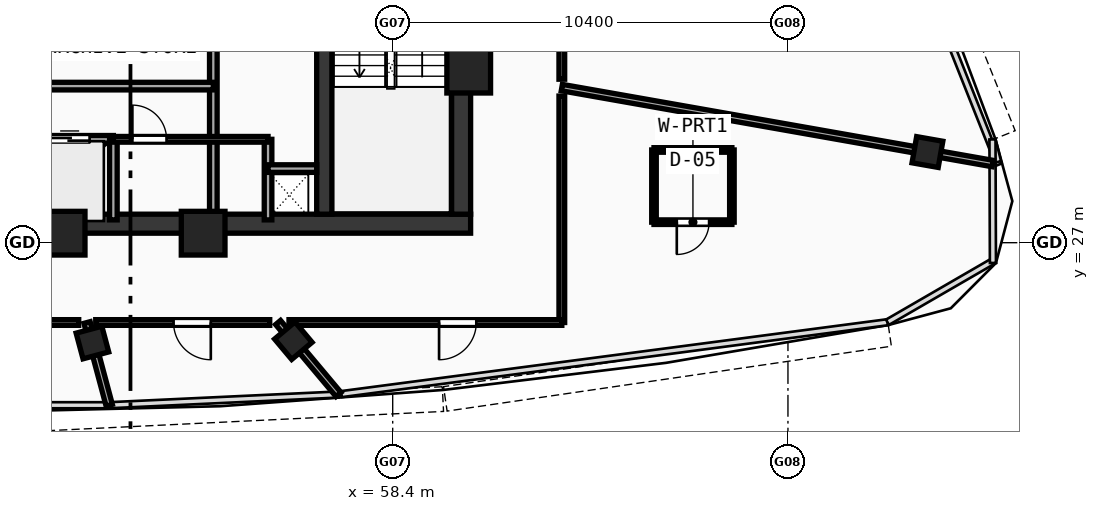
"""IFC4 building model, lengths in metres.
Left out: names, types, materials, properties, quantities, classifications, styles, units other than length and angle.
Written with IfcOpenShell. Run it as: python <this file> out.ifc"""

import sys

from ifc_helpers import new_model, si_unit, direction, frame, frame_2d, origin, origin_with_axes, origin_2d, place, context, subcontext, project, spatial, rectangle, hollow_rectangle, extrude, source, transform, mapped, element, fill, save


model = new_model("IFC4")
c1 = context("Model", 3, precision=1e-05, world=origin(), true_north=direction((0.0, 1.0)))
c2 = subcontext(c1, "Body", "Model", "MODEL_VIEW")
j1 = project(units=[si_unit("LENGTHUNIT", "METRE"), si_unit("PLANEANGLEUNIT", "RADIAN")], contexts=[c1])
p1 = place(None, origin())
s1 = spatial("IfcSite", under=j1, at=p1, CompositionType="ELEMENT")
p2 = place(p1, origin())
s2 = spatial("IfcBuilding", under=s1, at=p2, CompositionType="ELEMENT")
p3 = place(p2, frame((0.0, 0.0, 363.01)))
s3 = spatial("IfcBuildingStorey", under=s2, at=p3, CompositionType="ELEMENT", Elevation=363.01)
p4 = place(p3, frame((35.55, 27.5, 0.0), z_axis=(0.0, 0.0, 1.0), x_axis=(1.0, 0.0, 0.0)))
e1 = element("IfcWall", 1, at=p4, inside=s3, PredefinedType="SHEAR", context=c2, shape_type="SweptSolid", body=[
    extrude(rectangle(XDim=24.9, YDim=0.5, at=frame_2d((12.45, 0.0))), origin(), (0.0, 0.0, 1.0), 3.47),
])
p5 = place(p3, frame((60.2, 27.75, 0.0), z_axis=(0.0, 0.0, 1.0), x_axis=(0.0, 1.0, 0.0)))
e2 = element("IfcWall", 2, at=p5, inside=s3, PredefinedType="SHEAR", context=c2, shape_type="SweptSolid", body=[
    extrude(rectangle(XDim=12.2, YDim=0.5, at=frame_2d((6.1, 0.0))), origin(), (0.0, 0.0, 1.0), 3.47),
])
p6 = place(p3, frame((56.6, 27.75, 0.0), z_axis=(0.0, 0.0, 1.0), x_axis=(0.0, 1.0, 0.0)))
e3 = element("IfcWall", 3, at=p6, inside=s3, PredefinedType="SHEAR", context=c2, shape_type="SweptSolid", body=[
    extrude(rectangle(XDim=12.2, YDim=0.4, at=frame_2d((6.1, 0.0))), origin(), (0.0, 0.0, 1.0), 3.47),
])
p7 = place(p6, frame((10.0, 0.0, 0.0)))
e4 = element("IfcOpeningElement", 4, at=p7, cuts=e3, PredefinedType="OPENING", context=c2, shape_type="SweptSolid", body=[
    extrude(rectangle(XDim=1.1, YDim=2.1, at=frame_2d((0.55, 1.05))), frame((0.0, 0.21, 0.0), z_axis=(0.0, -1.0, 0.0), x_axis=(1.0, 0.0, 0.0)), (0.0, 0.0, 1.0), 0.42),
])
m1 = source(origin(), c2, "Body", "SweptSolid", [
    extrude(hollow_rectangle(XDim=1.15, YDim=1.15, WallThickness=0.048, at=origin_2d()), origin(), (0.0, 0.0, 1.0), 3.73),
])
for number, where, z_axis, x_axis in (
    (5, (49.729, 27.25, -0.26), (0.0, 0.0, 1.0), (1.0, 0.0, 0.0)),
    (6, (53.412, 27.25, -0.26), (0.0, 0.0, 1.0), (1.0, 0.0, 0.0)),
    (7, (60.4, 31.513, -0.26), (0.0, 0.0, 1.0), (1.0, 0.0, 0.0)),
):
    element("IfcColumn", number, at=place(p3, frame(where, z_axis=z_axis, x_axis=x_axis)), inside=s3, PredefinedType="COLUMN", context=c2, shape_type="MappedRepresentation", body=[
        mapped(m1, transform((0.0, 0.0, 0.0), scale=1.0)),
    ])
m2 = source(origin(), c2, "Body", "SweptSolid", [
    extrude(hollow_rectangle(XDim=0.7, YDim=0.7, WallThickness=0.026, at=origin_2d()), origin(), (0.0, 0.0, 1.0), 3.73),
])
for number, where, z_axis, x_axis in (
    (8, (50.499, 24.373, -0.26), (0.0, 0.0, 1.0), (0.966, 0.259, 0.0)),
    (9, (55.785, 24.422, -0.26), (0.0, 0.0, 1.0), (0.766, 0.643, 0.0)),
    (10, (72.47, 29.385, -0.26), (0.0, 0.0, 1.0), (0.174, 0.985, 0.0)),
):
    element("IfcColumn", number, at=place(p3, frame(where, z_axis=z_axis, x_axis=x_axis)), inside=s3, PredefinedType="COLUMN", context=c2, shape_type="MappedRepresentation", body=[
        mapped(m2, transform((0.0, 0.0, 0.0), scale=1.0)),
    ])
p8 = place(p3, frame((53.68, 27.6, 0.0), z_axis=(0.0, 0.0, 1.0), x_axis=(0.0, 1.0, 0.0)))
e11 = element("IfcWall", 11, at=p8, inside=s3, PredefinedType="SOLIDWALL", context=c2, shape_type="SweptSolid", body=[
    extrude(rectangle(XDim=9.05, YDim=0.2, at=frame_2d((4.525, 0.0))), origin(), (0.0, 0.0, 1.0), 3.47),
])
p9 = place(p8, frame((6.9, 0.0, 0.0)))
e12 = element("IfcOpeningElement", 12, at=p9, cuts=e11, PredefinedType="OPENING", context=c2, shape_type="SweptSolid", body=[
    extrude(rectangle(XDim=1.05, YDim=2.1, at=frame_2d((0.525, 1.05))), frame((0.0, 0.11, 0.0), z_axis=(0.0, -1.0, 0.0), x_axis=(1.0, 0.0, 0.0)), (0.0, 0.0, 1.0), 0.22),
])
p10 = place(p3, frame((43.85, 29.72, 0.0), z_axis=(0.0, 0.0, 1.0), x_axis=(1.0, 0.0, 0.0)))
e13 = element("IfcWall", 13, at=p10, inside=s3, PredefinedType="SOLIDWALL", context=c2, shape_type="SweptSolid", body=[
    extrude(rectangle(XDim=7.2, YDim=0.2, at=frame_2d((3.6, 0.0))), origin(), (0.0, 0.0, 1.0), 3.47),
])
p11 = place(p10, frame((0.625, 0.0, 0.0)))
e14 = element("IfcOpeningElement", 14, at=p11, cuts=e13, PredefinedType="OPENING", context=c2, shape_type="SweptSolid", body=[
    extrude(rectangle(XDim=1.05, YDim=2.1, at=frame_2d((0.525, 1.05))), frame((0.0, 0.11, 0.0), z_axis=(0.0, -1.0, 0.0), x_axis=(1.0, 0.0, 0.0)), (0.0, 0.0, 1.0), 0.22),
])
p12 = place(p10, frame((3.075, 0.0, 0.0)))
e15 = element("IfcOpeningElement", 15, at=p12, cuts=e13, PredefinedType="OPENING", context=c2, shape_type="SweptSolid", body=[
    extrude(rectangle(XDim=1.05, YDim=2.1, at=frame_2d((0.525, 1.05))), frame((0.0, 0.11, 0.0), z_axis=(0.0, -1.0, 0.0), x_axis=(1.0, 0.0, 0.0)), (0.0, 0.0, 1.0), 0.22),
])
p13 = place(p10, frame((5.525, 0.0, 0.0)))
e16 = element("IfcOpeningElement", 16, at=p13, cuts=e13, PredefinedType="OPENING", context=c2, shape_type="SweptSolid", body=[
    extrude(rectangle(XDim=1.05, YDim=2.1, at=frame_2d((0.525, 1.05))), frame((0.0, 0.11, 0.0), z_axis=(0.0, -1.0, 0.0), x_axis=(1.0, 0.0, 0.0)), (0.0, 0.0, 1.0), 0.22),
])
p14 = place(p3, frame((51.05, 27.6, 0.0), z_axis=(0.0, 0.0, 1.0), x_axis=(0.0, 1.0, 0.0)))
e17 = element("IfcWall", 17, at=p14, inside=s3, PredefinedType="SOLIDWALL", context=c2, shape_type="SweptSolid", body=[
    extrude(rectangle(XDim=2.12, YDim=0.2, at=frame_2d((1.06, 0.0))), origin(), (0.0, 0.0, 1.0), 3.47),
])
p15 = place(p3, frame((43.85, 31.12, 0.0), z_axis=(0.0, 0.0, 1.0), x_axis=(1.0, 0.0, 0.0)))
e18 = element("IfcWall", 18, at=p15, inside=s3, PredefinedType="SOLIDWALL", context=c2, shape_type="SweptSolid", body=[
    extrude(rectangle(XDim=9.83, YDim=0.2, at=frame_2d((4.915, 0.0))), origin(), (0.0, 0.0, 1.0), 3.47),
])
p16 = place(p3, frame((55.12, 27.6, 0.0), z_axis=(0.0, 0.0, 1.0), x_axis=(0.0, 1.0, 0.0)))
e19 = element("IfcWall", 19, at=p16, inside=s3, PredefinedType="SOLIDWALL", context=c2, shape_type="SweptSolid", body=[
    extrude(rectangle(XDim=2.12, YDim=0.2, at=frame_2d((1.06, 0.0))), origin(), (0.0, 0.0, 1.0), 3.47),
])
p17 = place(p3, frame((55.12, 28.95, 0.0), z_axis=(0.0, 0.0, 1.0), x_axis=(1.0, 0.0, 0.0)))
e20 = element("IfcWall", 20, at=p17, inside=s3, PredefinedType="SOLIDWALL", context=c2, shape_type="SweptSolid", body=[
    extrude(rectangle(XDim=1.28, YDim=0.2, at=frame_2d((0.64, 0.0))), origin(), (0.0, 0.0, 1.0), 3.47),
])
p18 = place(p3, frame((51.05, 29.72, 0.0), z_axis=(0.0, 0.0, 1.0), x_axis=(1.0, 0.0, 0.0)))
e21 = element("IfcWall", 21, at=p18, inside=s3, PredefinedType="PARTITIONING", context=c2, shape_type="SweptSolid", body=[
    extrude(rectangle(XDim=4.07, YDim=0.15, at=frame_2d((2.035, 0.0))), origin(), (0.0, 0.0, 1.0), 3.47),
])
p19 = place(p18, frame((0.5, 0.0, 0.0)))
e22 = element("IfcOpeningElement", 22, at=p19, cuts=e21, PredefinedType="OPENING", context=c2, shape_type="SweptSolid", body=[
    extrude(rectangle(XDim=0.9, YDim=2.1, at=frame_2d((0.45, 1.05))), frame((0.0, 0.085, 0.0), z_axis=(0.0, -1.0, 0.0), x_axis=(1.0, 0.0, 0.0)), (0.0, 0.0, 1.0), 0.17),
])
p20 = place(p3, frame((50.358, 24.9, 0.0), z_axis=(0.0, 0.0, 1.0), x_axis=(0.258842593831, -0.965919516119, 0.0)))
e23 = element("IfcWall", 23, at=p20, inside=s3, PredefinedType="PARTITIONING", context=c2, shape_type="SweptSolid", body=[
    extrude(rectangle(XDim=2.253, YDim=0.17, at=frame_2d((1.127, 0.0))), origin(), (0.0, 0.0, 1.0), 2.87),
])
p21 = place(p3, frame((55.384, 24.9, 0.0), z_axis=(0.0, 0.0, 1.0), x_axis=(0.642821604445, -0.766015916844, 0.0)))
e24 = element("IfcWall", 24, at=p21, inside=s3, PredefinedType="PARTITIONING", context=c2, shape_type="SweptSolid", body=[
    extrude(rectangle(XDim=2.473, YDim=0.17, at=frame_2d((1.237, 0.0))), origin(), (0.0, 0.0, 1.0), 2.87),
])
p22 = place(p3, frame((62.85, 31.082, 0.0), z_axis=(0.0, 0.0, 1.0), x_axis=(0.984809380036, -0.173638950101, 0.0)))
e25 = element("IfcWall", 25, at=p22, inside=s3, PredefinedType="PARTITIONING", context=c2, shape_type="SweptSolid", body=[
    extrude(rectangle(XDim=11.512, YDim=0.17, at=frame_2d((5.756, 0.0))), origin(), (0.0, 0.0, 1.0), 2.87),
])
p23 = place(p3, frame((62.85, 38.305, 0.0), z_axis=(0.0, 0.0, 1.0), x_axis=(0.0, -1.0, 0.0)))
e26 = element("IfcWall", 26, at=p23, inside=s3, PredefinedType="PARTITIONING", context=c2, shape_type="SweptSolid", body=[
    extrude(rectangle(XDim=7.004, YDim=0.15, at=frame_2d((3.502, 0.0))), origin(), (0.0, 0.0, 1.0), 3.47),
])
p24 = place(p23, frame((3.042, 0.0, 0.0)))
e27 = element("IfcOpeningElement", 27, at=p24, cuts=e26, PredefinedType="OPENING", context=c2, shape_type="SweptSolid", body=[
    extrude(rectangle(XDim=0.92, YDim=2.1, at=frame_2d((0.46, 1.05))), frame((0.0, 0.085, 0.0), z_axis=(0.0, -1.0, 0.0), x_axis=(1.0, 0.0, 0.0)), (0.0, 0.0, 1.0), 0.17),
])
p25 = place(p3, frame((62.85, 30.858, 0.0), z_axis=(0.0, 0.0, 1.0), x_axis=(0.0, -1.0, 0.0)))
e28 = element("IfcWall", 28, at=p25, inside=s3, PredefinedType="PARTITIONING", context=c2, shape_type="SweptSolid", body=[
    extrude(rectangle(XDim=5.958, YDim=0.15, at=frame_2d((2.979, 0.0))), origin(), (0.0, 0.0, 1.0), 2.87),
])
p26 = place(p3, frame((62.85, 24.9, 0.0), z_axis=(0.0, 0.0, 1.0), x_axis=(-1.0, 0.0, 0.0)))
e29 = element("IfcWall", 29, at=p26, inside=s3, PredefinedType="PARTITIONING", context=c2, shape_type="SweptSolid", body=[
    extrude(rectangle(XDim=7.179, YDim=0.15, at=frame_2d((3.589, 0.0))), origin(), (0.0, 0.0, 1.0), 2.87),
])
p27 = place(p26, frame((2.25, 0.0, 0.0)))
e30 = element("IfcOpeningElement", 30, at=p27, cuts=e29, PredefinedType="OPENING", context=c2, shape_type="SweptSolid", body=[
    extrude(rectangle(XDim=0.98, YDim=2.12, at=frame_2d((0.49, 1.06))), frame((0.0, 0.085, 0.0), z_axis=(0.0, -1.0, 0.0), x_axis=(1.0, 0.0, 0.0)), (0.0, 0.0, 1.0), 0.17),
])
p28 = place(p3, frame((55.164, 24.9, 0.0), z_axis=(0.0, 0.0, 1.0), x_axis=(-1.0, 0.0, 0.0)))
e31 = element("IfcWall", 31, at=p28, inside=s3, PredefinedType="PARTITIONING", context=c2, shape_type="SweptSolid", body=[
    extrude(rectangle(XDim=4.579, YDim=0.15, at=frame_2d((2.289, 0.0))), origin(), (0.0, 0.0, 1.0), 3.47),
])
p29 = place(p28, frame((1.55, 0.0, 0.0)))
e32 = element("IfcOpeningElement", 32, at=p29, cuts=e31, PredefinedType="OPENING", context=c2, shape_type="SweptSolid", body=[
    extrude(rectangle(XDim=0.98, YDim=2.12, at=frame_2d((0.49, 1.06))), frame((0.0, 0.085, 0.0), z_axis=(0.0, -1.0, 0.0), x_axis=(1.0, 0.0, 0.0)), (0.0, 0.0, 1.0), 0.17),
])
p30 = place(p3, frame((50.138, 24.9, 0.0), z_axis=(0.0, 0.0, 1.0), x_axis=(-1.0, 0.0, 0.0)))
e33 = element("IfcWall", 33, at=p30, inside=s3, PredefinedType="PARTITIONING", context=c2, shape_type="SweptSolid", body=[
    extrude(rectangle(XDim=1.918, YDim=0.15, at=frame_2d((0.959, 0.0))), origin(), (0.0, 0.0, 1.0), 3.47),
])
p31 = place(p3, frame((65.275, 27.54, 0.0), z_axis=(0.0, 0.0, 1.0), x_axis=(1.0, 0.0, 0.0)))
e34 = element("IfcWall", 34, at=p31, inside=s3, PredefinedType="PARTITIONING", context=c2, shape_type="SweptSolid", body=[
    extrude(rectangle(XDim=2.05, YDim=0.12, at=frame_2d((1.025, 0.0))), origin(), (0.0, 0.0, 1.0), 2.87),
])
p32 = place(p31, frame((0.6, 0.0, 0.0)))
e35 = element("IfcOpeningElement", 35, at=p32, cuts=e34, PredefinedType="OPENING", context=c2, shape_type="SweptSolid", body=[
    extrude(rectangle(XDim=0.85, YDim=2.1, at=frame_2d((0.425, 1.05))), frame((0.0, 0.07, 0.0), z_axis=(0.0, -1.0, 0.0), x_axis=(1.0, 0.0, 0.0)), (0.0, 0.0, 1.0), 0.14),
])
p33 = place(p3, frame((67.325, 27.54, 0.0), z_axis=(0.0, 0.0, 1.0), x_axis=(0.0, 1.0, 0.0)))
e36 = element("IfcWall", 36, at=p33, inside=s3, PredefinedType="PARTITIONING", context=c2, shape_type="SweptSolid", body=[
    extrude(rectangle(XDim=1.9, YDim=0.12, at=frame_2d((0.95, 0.0))), origin(), (0.0, 0.0, 1.0), 2.87),
])
p34 = place(p3, frame((67.325, 29.44, 0.0), z_axis=(0.0, 0.0, 1.0), x_axis=(-1.0, 0.0, 0.0)))
e37 = element("IfcWall", 37, at=p34, inside=s3, PredefinedType="PARTITIONING", context=c2, shape_type="SweptSolid", body=[
    extrude(rectangle(XDim=2.05, YDim=0.12, at=frame_2d((1.025, 0.0))), origin(), (0.0, 0.0, 1.0), 3.47),
])
p35 = place(p3, frame((65.275, 29.44, 0.0), z_axis=(0.0, 0.0, 1.0), x_axis=(0.0, -1.0, 0.0)))
e38 = element("IfcWall", 38, at=p35, inside=s3, PredefinedType="PARTITIONING", context=c2, shape_type="SweptSolid", body=[
    extrude(rectangle(XDim=1.9, YDim=0.12, at=frame_2d((0.95, 0.0))), origin(), (0.0, 0.0, 1.0), 3.47),
])
m3 = source(origin(), c2, "Body", "SweptSolid", [
    extrude(rectangle(XDim=1.05, YDim=2.1, at=frame_2d((0.525, 1.05))), frame((0.0, 0.025, 0.0), z_axis=(0.0, -1.0, 0.0), x_axis=(1.0, 0.0, 0.0)), (0.0, 0.0, 1.0), 0.05),
])
p36 = place(p13, origin_with_axes())
e39 = element("IfcDoor", 39, at=p36, inside=s3, OperationType="DOUBLE_DOOR_SLIDING", PredefinedType="DOOR", context=c2, shape_type="MappedRepresentation", body=[
    mapped(m3, transform((0.0, 0.0, 0.0), scale=1.0)),
])
fill(e16, e39)
m4 = source(origin(), c2, "Body", "SweptSolid", [
    extrude(rectangle(XDim=0.9, YDim=2.1, at=frame_2d((0.45, 1.05))), frame((0.0, 0.025, 0.0), z_axis=(0.0, -1.0, 0.0), x_axis=(1.0, 0.0, 0.0)), (0.0, 0.0, 1.0), 0.05),
])
p37 = place(p19, origin_with_axes())
e40 = element("IfcDoor", 40, at=p37, inside=s3, OperationType="SINGLE_SWING_LEFT", PredefinedType="DOOR", context=c2, shape_type="MappedRepresentation", body=[
    mapped(m4, transform((0.0, 0.0, 0.0), scale=1.0)),
])
fill(e22, e40)
m5 = source(origin(), c2, "Body", "SweptSolid", [
    extrude(rectangle(XDim=0.98, YDim=2.12, at=frame_2d((0.49, 1.06))), frame((0.0, 0.025, 0.0), z_axis=(0.0, -1.0, 0.0), x_axis=(1.0, 0.0, 0.0)), (0.0, 0.0, 1.0), 0.05),
])
p38 = place(p29, origin_with_axes())
e41 = element("IfcDoor", 41, at=p38, inside=s3, OperationType="SINGLE_SWING_LEFT", PredefinedType="DOOR", context=c2, shape_type="MappedRepresentation", body=[
    mapped(m5, transform((0.0, 0.0, 0.0), scale=1.0)),
])
fill(e32, e41)
p39 = place(p27, origin_with_axes())
e42 = element("IfcDoor", 42, at=p39, inside=s3, OperationType="SINGLE_SWING_RIGHT", PredefinedType="DOOR", context=c2, shape_type="MappedRepresentation", body=[
    mapped(m5, transform((0.0, 0.0, 0.0), scale=1.0)),
])
fill(e30, e42)
m6 = source(origin(), c2, "Body", "SweptSolid", [
    extrude(rectangle(XDim=0.85, YDim=2.1, at=frame_2d((0.425, 1.05))), frame((0.0, 0.025, 0.0), z_axis=(0.0, -1.0, 0.0), x_axis=(1.0, 0.0, 0.0)), (0.0, 0.0, 1.0), 0.05),
])
p40 = place(p32, frame((0.85, 0.0, 0.0), z_axis=(0.0, 0.0, 1.0), x_axis=(-1.0, 0.0, 0.0)))
e43 = element("IfcDoor", 43, at=p40, inside=s3, OperationType="SINGLE_SWING_RIGHT", PredefinedType="DOOR", context=c2, shape_type="MappedRepresentation", body=[
    mapped(m6, transform((0.0, 0.0, 0.0), scale=1.0)),
])
fill(e35, e43)
save(model, sys.argv[1])
